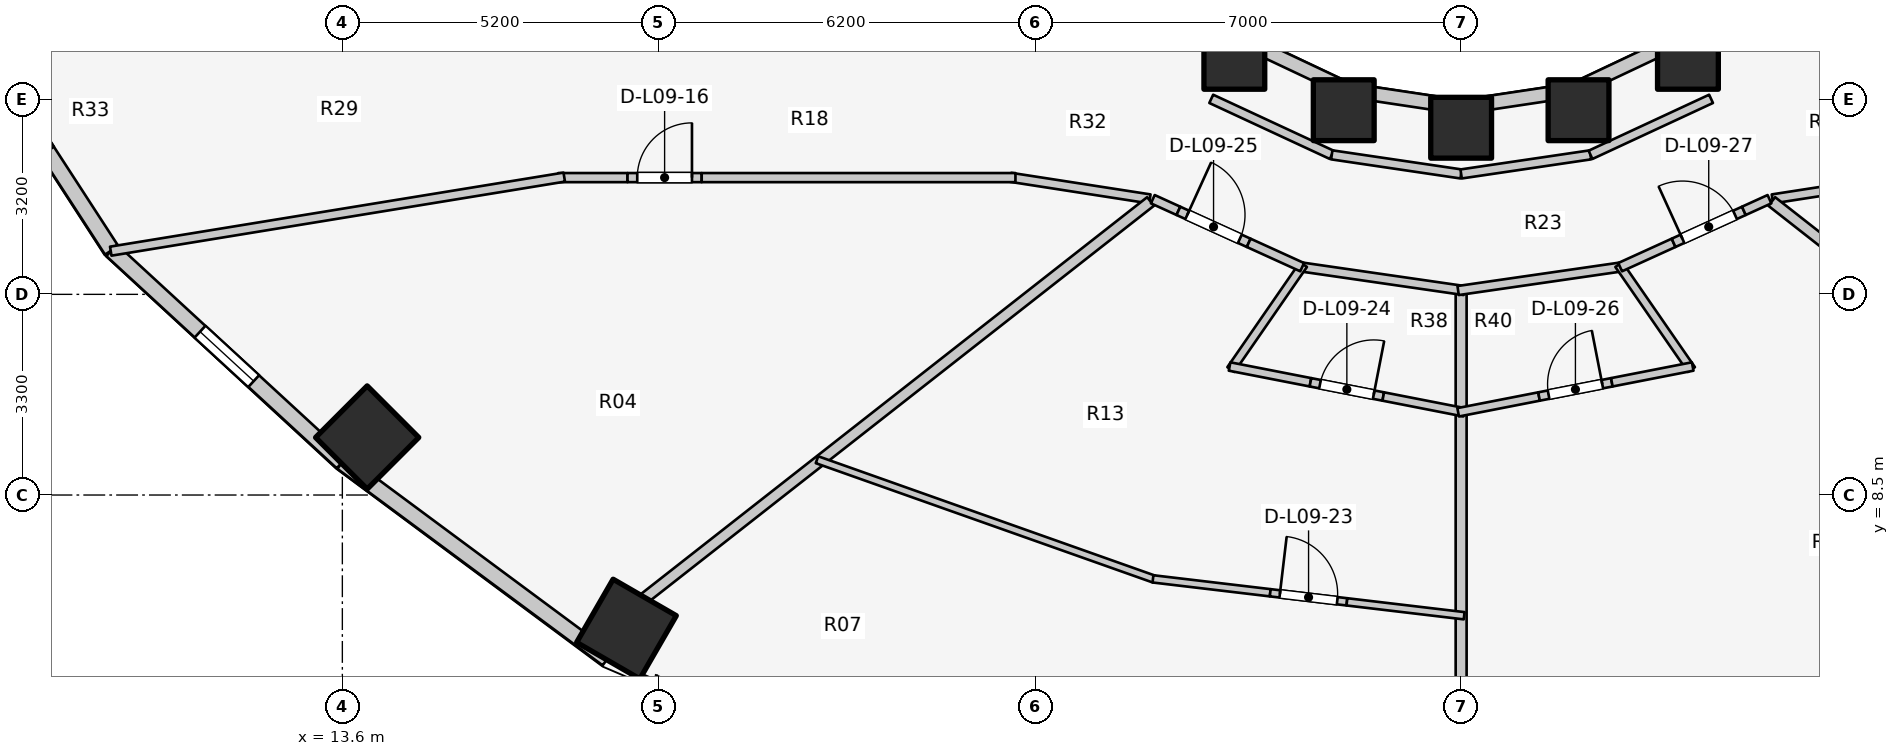
"""IFC4 building model, lengths in metres.
Left out: names, types, materials, properties, quantities, classifications, styles, units other than length and angle.
Written with IfcOpenShell. Run it as: python <this file> out.ifc"""

import sys

from ifc_helpers import new_model, si_unit, direction, frame, frame_2d, origin, origin_2d, place, context, subcontext, project, spatial, rectangle, extrude, element, fill, save


model = new_model("IFC4")
c1 = context("Model", 3, precision=1e-05, world=origin(), true_north=direction((0.0, 1.0)))
c2 = subcontext(c1, "Body", "Model", "MODEL_VIEW")
j1 = project(units=[si_unit("LENGTHUNIT", "METRE"), si_unit("PLANEANGLEUNIT", "RADIAN")], contexts=[c1])
p1 = place(None, origin())
s1 = spatial("IfcSite", under=j1, at=p1, CompositionType="ELEMENT")
p2 = place(p1, origin())
s2 = spatial("IfcBuilding", under=s1, at=p2, CompositionType="ELEMENT")
p3 = place(p2, frame((0.0, 0.0, 33.8)))
s3 = spatial("IfcBuildingStorey", under=s2, at=p3, CompositionType="ELEMENT", Elevation=33.8)
p4 = place(p3, frame((14.008, 9.446, 0.0), z_axis=(0.0, 0.0, 1.0), x_axis=(-0.707106781187, -0.707106781187, 0.0)))
e1 = element("IfcColumn", 1, at=p4, inside=s3, PredefinedType="COLUMN", context=c2, shape_type="SweptSolid", body=[
    extrude(rectangle(XDim=1.2, YDim=1.2, at=origin_2d()), origin(), (0.0, 0.0, 1.0), 3.1),
])
p5 = place(p3, frame((28.27, 15.673, 0.0), z_axis=(0.0, 0.0, 1.0), x_axis=(1.0, 0.0, 0.0)))
e2 = element("IfcColumn", 2, at=p5, inside=s3, PredefinedType="COLUMN", context=c2, shape_type="SweptSolid", body=[
    extrude(rectangle(XDim=1.0, YDim=1.0, at=origin_2d()), origin(), (0.0, 0.0, 1.0), 3.1),
])
p6 = place(p3, frame((18.273, 6.296, 0.0), z_axis=(0.0, 0.0, 1.0), x_axis=(-0.5, -0.866025403784, 0.0)))
e3 = element("IfcColumn", 3, at=p6, inside=s3, PredefinedType="COLUMN", context=c2, shape_type="SweptSolid", body=[
    extrude(rectangle(XDim=1.2, YDim=1.2, at=origin_2d()), origin(), (0.0, 0.0, 1.0), 3.1),
])
for number, where, z_axis, x_axis in (
    (4, (30.069, 14.828, 0.0), (0.0, 0.0, 1.0), (1.0, 0.0, 0.0)),
    (5, (32.0, 14.54, 0.0), (0.0, 0.0, 1.0), (1.0, 0.0, 0.0)),
    (6, (33.931, 14.828, 0.0), (0.0, 0.0, 1.0), (1.0, 0.0, 0.0)),
    (7, (35.73, 15.673, 0.0), (0.0, 0.0, 1.0), (1.0, 0.0, 0.0)),
):
    element("IfcColumn", number, at=place(p3, frame(where, z_axis=z_axis, x_axis=x_axis)), inside=s3, PredefinedType="COLUMN", context=c2, shape_type="SweptSolid", body=[
        extrude(rectangle(XDim=1.0, YDim=1.0, at=origin_2d()), origin(), (0.0, 0.0, 1.0), 3.1),
    ])
p7 = place(p3, frame((28.44, 15.968, 0.0), z_axis=(0.0, 0.0, 1.0), x_axis=(0.904179699603, -0.427152280606, 0.0)))
e8 = element("IfcWall", 8, at=p7, inside=s3, PredefinedType="STANDARD", context=c2, shape_type="SweptSolid", body=[
    extrude(rectangle(XDim=1.899, YDim=0.23, at=frame_2d((0.95, 0.0))), origin(), (0.0, 0.0, 1.0), 1.22),
])
for number, where, z_axis, x_axis in (
    (9, (30.157, 15.157, 0.0), (0.0, 0.0, 1.0), (0.989, -0.149, 0.0)),
    (10, (32.0, 14.88, 0.0), (0.0, 0.0, 1.0), (0.989, 0.149, 0.0)),
):
    element("IfcWall", number, at=place(p3, frame(where, z_axis=z_axis, x_axis=x_axis)), inside=s3, PredefinedType="STANDARD", context=c2, shape_type="SweptSolid", body=[
        extrude(rectangle(XDim=1.864, YDim=0.23, at=frame_2d((0.932, 0.0))), origin(), (0.0, 0.0, 1.0), 1.22),
    ])
p8 = place(p3, frame((33.843, 15.157, 0.0), z_axis=(0.0, 0.0, 1.0), x_axis=(0.904179699603, 0.427152280606, 0.0)))
e11 = element("IfcWall", 11, at=p8, inside=s3, PredefinedType="STANDARD", context=c2, shape_type="SweptSolid", body=[
    extrude(rectangle(XDim=1.899, YDim=0.23, at=frame_2d((0.95, 0.0))), origin(), (0.0, 0.0, 1.0), 1.22),
])
p9 = place(p3, frame((7.033, 16.795, 0.0), z_axis=(0.0, 0.0, 1.0), x_axis=(0.544578722263, -0.838709732421, 0.0)))
e12 = element("IfcWall", 12, at=p9, inside=s3, PredefinedType="STANDARD", context=c2, shape_type="SweptSolid", body=[
    extrude(rectangle(XDim=5.092, YDim=0.26, at=frame_2d((2.546, 0.0))), origin(), (0.0, 0.0, 1.0), 1.22),
])
p10 = place(p9, frame((1.946, 0.0, 0.15)))
e13 = element("IfcOpeningElement", 13, at=p10, cuts=e12, PredefinedType="OPENING", context=c2, shape_type="SweptSolid", body=[
    extrude(rectangle(XDim=1.2, YDim=0.9, at=frame_2d((0.6, 0.45))), frame((0.0, 0.14, 0.0), z_axis=(0.0, -1.0, 0.0), x_axis=(1.0, 0.0, 0.0)), (0.0, 0.0, 1.0), 0.28),
])
p11 = place(p3, frame((9.806, 12.524, 0.0), z_axis=(0.0, 0.0, 1.0), x_axis=(0.735655109293, -0.67735630223, 0.0)))
e14 = element("IfcWall", 14, at=p11, inside=s3, PredefinedType="STANDARD", context=c2, shape_type="SweptSolid", body=[
    extrude(rectangle(XDim=5.151, YDim=0.26, at=frame_2d((2.575, 0.0))), origin(), (0.0, 0.0, 1.0), 1.22),
])
p12 = place(p11, frame((1.976, 0.0, 0.15)))
e15 = element("IfcOpeningElement", 15, at=p12, cuts=e14, PredefinedType="OPENING", context=c2, shape_type="SweptSolid", body=[
    extrude(rectangle(XDim=1.2, YDim=0.9, at=frame_2d((0.6, 0.45))), frame((0.0, 0.14, 0.0), z_axis=(0.0, -1.0, 0.0), x_axis=(1.0, 0.0, 0.0)), (0.0, 0.0, 1.0), 0.28),
])
p13 = place(p3, frame((13.595, 9.035, 0.0), z_axis=(0.0, 0.0, 1.0), x_axis=(0.803477531792, -0.595335078679, 0.0)))
e16 = element("IfcWall", 16, at=p13, inside=s3, PredefinedType="STANDARD", context=c2, shape_type="SweptSolid", body=[
    extrude(rectangle(XDim=5.43, YDim=0.26, at=frame_2d((2.715, 0.0))), origin(), (0.0, 0.0, 1.0), 1.22),
])
p14 = place(p3, frame((27.89, 15.015, 0.0), z_axis=(0.0, 0.0, 1.0), x_axis=(0.906943449489, -0.421252393975, 0.0)))
e17 = element("IfcWall", 17, at=p14, inside=s3, PredefinedType="PARTITIONING", context=c2, shape_type="SweptSolid", body=[
    extrude(rectangle(XDim=2.186, YDim=0.15, at=frame_2d((1.093, 0.0))), origin(), (0.0, 0.0, 1.0), 1.22),
])
for number, where, z_axis, x_axis in (
    (18, (29.873, 14.094, 0.0), (0.0, 0.0, 1.0), (0.989, -0.146, 0.0)),
    (19, (32.0, 13.78, 0.0), (0.0, 0.0, 1.0), (0.989, 0.146, 0.0)),
):
    element("IfcWall", number, at=place(p3, frame(where, z_axis=z_axis, x_axis=x_axis)), inside=s3, PredefinedType="PARTITIONING", context=c2, shape_type="SweptSolid", body=[
        extrude(rectangle(XDim=2.151, YDim=0.15, at=frame_2d((1.075, 0.0))), origin(), (0.0, 0.0, 1.0), 1.22),
    ])
p15 = place(p3, frame((34.127, 14.094, 0.0), z_axis=(0.0, 0.0, 1.0), x_axis=(0.906943449489, 0.421252393975, 0.0)))
e20 = element("IfcWall", 20, at=p15, inside=s3, PredefinedType="PARTITIONING", context=c2, shape_type="SweptSolid", body=[
    extrude(rectangle(XDim=2.186, YDim=0.15, at=frame_2d((1.093, 0.0))), origin(), (0.0, 0.0, 1.0), 1.22),
])
p16 = place(p3, frame((26.881, 13.369, 0.0), z_axis=(0.0, 0.0, 1.0), x_axis=(-0.988184633586, 0.153268163508, 0.0)))
e21 = element("IfcWall", 21, at=p16, inside=s3, PredefinedType="PARTITIONING", context=c2, shape_type="SweptSolid", body=[
    extrude(rectangle(XDim=2.318, YDim=0.15, at=frame_2d((1.159, 0.0))), origin(), (0.0, 0.0, 1.0), 1.22),
])
p17 = place(p3, frame((17.15, 13.72, 0.0), z_axis=(0.0, 0.0, 1.0), x_axis=(1.0, 0.0, 0.0)))
e22 = element("IfcWall", 22, at=p17, inside=s3, PredefinedType="PARTITIONING", context=c2, shape_type="SweptSolid", body=[
    extrude(rectangle(XDim=1.14, YDim=0.15, at=frame_2d((0.57, 0.0))), origin(), (0.0, 0.0, 1.0), 2.575),
])
p18 = place(p3, frame((18.29, 13.72, 0.0), z_axis=(0.0, 0.0, 1.0), x_axis=(1.0, 0.0, 0.0)))
e23 = element("IfcWall", 23, at=p18, inside=s3, PredefinedType="PARTITIONING", context=c2, shape_type="SweptSolid", body=[
    extrude(rectangle(XDim=1.22, YDim=0.15, at=frame_2d((0.61, 0.0))), origin(), (0.0, 0.0, 1.0), 2.575),
])
p19 = place(p18, frame((0.16, 0.0, 0.0)))
e24 = element("IfcOpeningElement", 24, at=p19, cuts=e23, PredefinedType="OPENING", context=c2, shape_type="SweptSolid", body=[
    extrude(rectangle(XDim=0.9, YDim=2.1, at=frame_2d((0.45, 1.05))), frame((0.0, 0.085, 0.0), z_axis=(0.0, -1.0, 0.0), x_axis=(1.0, 0.0, 0.0)), (0.0, 0.0, 1.0), 0.17),
])
p20 = place(p3, frame((19.51, 13.72, 0.0), z_axis=(0.0, 0.0, 1.0), x_axis=(1.0, 0.0, 0.0)))
e25 = element("IfcWall", 25, at=p20, inside=s3, PredefinedType="PARTITIONING", context=c2, shape_type="SweptSolid", body=[
    extrude(rectangle(XDim=5.16, YDim=0.15, at=frame_2d((2.58, 0.0))), origin(), (0.0, 0.0, 1.0), 1.22),
])
p21 = place(p3, frame((17.249, 13.728, 0.0), z_axis=(0.0, 0.0, 1.0), x_axis=(-0.98693078372, -0.161144742846, 0.0)))
e26 = element("IfcWall", 26, at=p21, inside=s3, PredefinedType="PARTITIONING", context=c2, shape_type="SweptSolid", body=[
    extrude(rectangle(XDim=7.557, YDim=0.15, at=frame_2d((3.779, 0.0))), origin(), (0.0, 0.0, 1.0), 1.22),
])
p22 = place(p3, frame((37.119, 13.369, 0.0), z_axis=(0.0, 0.0, 1.0), x_axis=(0.988184633586, 0.153268163508, 0.0)))
e27 = element("IfcWall", 27, at=p22, inside=s3, PredefinedType="PARTITIONING", context=c2, shape_type="SweptSolid", body=[
    extrude(rectangle(XDim=2.318, YDim=0.15, at=frame_2d((1.159, 0.0))), origin(), (0.0, 0.0, 1.0), 1.22),
])
p23 = place(p3, frame((26.892, 13.327, 0.0), z_axis=(0.0, 0.0, 1.0), x_axis=(-0.78700868866, -0.616941912966, 0.0)))
e28 = element("IfcWall", 28, at=p23, inside=s3, PredefinedType="PARTITIONING", context=c2, shape_type="SweptSolid", body=[
    extrude(rectangle(XDim=10.583, YDim=0.18, at=frame_2d((5.292, 0.0))), origin(), (0.0, 0.0, 1.0), 1.22),
])
p24 = place(p3, frame((32.0, 11.815, 0.0), z_axis=(0.0, 0.0, 1.0), x_axis=(0.0, -1.0, 0.0)))
e29 = element("IfcWall", 29, at=p24, inside=s3, PredefinedType="PARTITIONING", context=c2, shape_type="SweptSolid", body=[
    extrude(rectangle(XDim=8.115, YDim=0.18, at=frame_2d((4.058, 0.0))), origin(), (0.0, 0.0, 1.0), 1.22),
])
p25 = place(p3, frame((37.108, 13.327, 0.0), z_axis=(0.0, 0.0, 1.0), x_axis=(0.78700868866, -0.616941912966, 0.0)))
e30 = element("IfcWall", 30, at=p25, inside=s3, PredefinedType="PARTITIONING", context=c2, shape_type="SweptSolid", body=[
    extrude(rectangle(XDim=10.583, YDim=0.18, at=frame_2d((5.292, 0.0))), origin(), (0.0, 0.0, 1.0), 1.22),
])
p26 = place(p3, frame((21.406, 9.081, 0.0), z_axis=(0.0, 0.0, 1.0), x_axis=(0.942625048334, -0.333853288517, 0.0)))
e31 = element("IfcWall", 31, at=p26, inside=s3, PredefinedType="MOVABLE", context=c2, shape_type="SweptSolid", body=[
    extrude(rectangle(XDim=5.882, YDim=0.12, at=frame_2d((2.941, 0.0))), origin(), (0.0, 0.0, 1.0), 1.22),
])
p27 = place(p3, frame((26.932, 7.121, 0.0), z_axis=(0.0, 0.0, 1.0), x_axis=(0.993052427277, -0.117672752492, 0.0)))
e32 = element("IfcWall", 32, at=p27, inside=s3, PredefinedType="MOVABLE", context=c2, shape_type="SweptSolid", body=[
    extrude(rectangle(XDim=1.942, YDim=0.12, at=frame_2d((0.971, 0.0))), origin(), (0.0, 0.0, 1.0), 2.575),
])
p28 = place(p3, frame((28.86, 6.893, 0.0), z_axis=(0.0, 0.0, 1.0), x_axis=(0.993055805273, -0.11764424174, 0.0)))
e33 = element("IfcWall", 33, at=p28, inside=s3, PredefinedType="MOVABLE", context=c2, shape_type="SweptSolid", body=[
    extrude(rectangle(XDim=1.27, YDim=0.12, at=frame_2d((0.635, 0.0))), origin(), (0.0, 0.0, 1.0), 2.575),
])
p29 = place(p28, frame((0.16, 0.0, 0.0)))
e34 = element("IfcOpeningElement", 34, at=p29, cuts=e33, PredefinedType="OPENING", context=c2, shape_type="SweptSolid", body=[
    extrude(rectangle(XDim=0.95, YDim=2.1, at=frame_2d((0.475, 1.05))), frame((0.0, 0.07, 0.0), z_axis=(0.0, -1.0, 0.0), x_axis=(1.0, 0.0, 0.0)), (0.0, 0.0, 1.0), 0.14),
])
p30 = place(p3, frame((30.121, 6.743, 0.0), z_axis=(0.0, 0.0, 1.0), x_axis=(0.993052427277, -0.117672752492, 0.0)))
e35 = element("IfcWall", 35, at=p30, inside=s3, PredefinedType="MOVABLE", context=c2, shape_type="SweptSolid", body=[
    extrude(rectangle(XDim=1.942, YDim=0.12, at=frame_2d((0.971, 0.0))), origin(), (0.0, 0.0, 1.0), 1.22),
])
p31 = place(p3, frame((29.329, 12.256, 0.0), z_axis=(0.0, 0.0, 1.0), x_axis=(0.989701115085, -0.143149232617, 0.0)))
e36 = element("IfcWall", 36, at=p31, inside=s3, PredefinedType="PARTITIONING", context=c2, shape_type="SweptSolid", body=[
    extrude(rectangle(XDim=2.749, YDim=0.15, at=frame_2d((1.375, 0.0))), origin(), (0.0, 0.0, 1.0), 1.22),
])
p32 = place(p3, frame((29.406, 12.29, 0.0), z_axis=(0.0, 0.0, 1.0), x_axis=(-0.568653635333, -0.822577074214, 0.0)))
e37 = element("IfcWall", 37, at=p32, inside=s3, PredefinedType="PLUMBINGWALL", context=c2, shape_type="SweptSolid", body=[
    extrude(rectangle(XDim=2.1, YDim=0.14, at=frame_2d((1.05, 0.0))), origin(), (0.0, 0.0, 1.0), 1.22),
])
p33 = place(p3, frame((28.192, 10.614, 0.0), z_axis=(0.0, 0.0, 1.0), x_axis=(0.981484809036, -0.191539994861, 0.0)))
e38 = element("IfcWall", 38, at=p33, inside=s3, PredefinedType="PLUMBINGWALL", context=c2, shape_type="SweptSolid", body=[
    extrude(rectangle(XDim=1.355, YDim=0.14, at=frame_2d((0.677, 0.0))), origin(), (0.0, 0.0, 1.0), 1.22),
])
p34 = place(p3, frame((29.522, 10.354, 0.0), z_axis=(0.0, 0.0, 1.0), x_axis=(0.981455717174, -0.191689006535, 0.0)))
e39 = element("IfcWall", 39, at=p34, inside=s3, PredefinedType="PLUMBINGWALL", context=c2, shape_type="SweptSolid", body=[
    extrude(rectangle(XDim=1.22, YDim=0.14, at=frame_2d((0.61, 0.0))), origin(), (0.0, 0.0, 1.0), 2.575),
])
p35 = place(p34, frame((0.16, 0.0, 0.0)))
e40 = element("IfcOpeningElement", 40, at=p35, cuts=e39, PredefinedType="OPENING", context=c2, shape_type="SweptSolid", body=[
    extrude(rectangle(XDim=0.9, YDim=2.1, at=frame_2d((0.45, 1.05))), frame((0.0, 0.08, 0.0), z_axis=(0.0, -1.0, 0.0), x_axis=(1.0, 0.0, 0.0)), (0.0, 0.0, 1.0), 0.16),
])
p36 = place(p3, frame((30.719, 10.12, 0.0), z_axis=(0.0, 0.0, 1.0), x_axis=(0.981450920641, -0.191713563349, 0.0)))
e41 = element("IfcWall", 41, at=p36, inside=s3, PredefinedType="PLUMBINGWALL", context=c2, shape_type="SweptSolid", body=[
    extrude(rectangle(XDim=1.355, YDim=0.14, at=frame_2d((0.677, 0.0))), origin(), (0.0, 0.0, 1.0), 1.22),
])
p37 = place(p3, frame((26.929, 13.365, 0.0), z_axis=(0.0, 0.0, 1.0), x_axis=(0.910185690705, -0.414200444756, 0.0)))
e42 = element("IfcWall", 42, at=p37, inside=s3, PredefinedType="PARTITIONING", context=c2, shape_type="SweptSolid", body=[
    extrude(rectangle(XDim=0.463, YDim=0.15, at=frame_2d((0.231, 0.0))), origin(), (0.0, 0.0, 1.0), 2.575),
])
p38 = place(p3, frame((27.35, 13.173, 0.0), z_axis=(0.0, 0.0, 1.0), x_axis=(0.910168885926, -0.414237370469, 0.0)))
e43 = element("IfcWall", 43, at=p38, inside=s3, PredefinedType="PARTITIONING", context=c2, shape_type="SweptSolid", body=[
    extrude(rectangle(XDim=1.27, YDim=0.15, at=frame_2d((0.635, 0.0))), origin(), (0.0, 0.0, 1.0), 2.16),
])
p39 = place(p38, frame((0.16, 0.0, 0.0)))
e44 = element("IfcOpeningElement", 44, at=p39, cuts=e43, PredefinedType="OPENING", context=c2, shape_type="SweptSolid", body=[
    extrude(rectangle(XDim=0.95, YDim=2.1, at=frame_2d((0.475, 1.05))), frame((0.0, 0.085, 0.0), z_axis=(0.0, -1.0, 0.0), x_axis=(1.0, 0.0, 0.0)), (0.0, 0.0, 1.0), 0.17),
])
p40 = place(p3, frame((28.506, 12.647, 0.0), z_axis=(0.0, 0.0, 1.0), x_axis=(0.910210554917, -0.414145802487, 0.0)))
e45 = element("IfcWall", 45, at=p40, inside=s3, PredefinedType="PARTITIONING", context=c2, shape_type="SweptSolid", body=[
    extrude(rectangle(XDim=0.966, YDim=0.15, at=frame_2d((0.483, 0.0))), origin(), (0.0, 0.0, 1.0), 1.22),
])
p41 = place(p3, frame((31.95, 11.863, 0.0), z_axis=(0.0, 0.0, 1.0), x_axis=(0.989701115085, 0.143149232617, 0.0)))
e46 = element("IfcWall", 46, at=p41, inside=s3, PredefinedType="PARTITIONING", context=c2, shape_type="SweptSolid", body=[
    extrude(rectangle(XDim=2.749, YDim=0.15, at=frame_2d((1.375, 0.0))), origin(), (0.0, 0.0, 1.0), 1.22),
])
p42 = place(p3, frame((34.594, 12.29, 0.0), z_axis=(0.0, 0.0, 1.0), x_axis=(0.568653635333, -0.822577074214, 0.0)))
e47 = element("IfcWall", 47, at=p42, inside=s3, PredefinedType="PLUMBINGWALL", context=c2, shape_type="SweptSolid", body=[
    extrude(rectangle(XDim=2.1, YDim=0.14, at=frame_2d((1.05, 0.0))), origin(), (0.0, 0.0, 1.0), 1.22),
])
p43 = place(p3, frame((31.951, 9.86, 0.0), z_axis=(0.0, 0.0, 1.0), x_axis=(0.981457541308, 0.191679666658, 0.0)))
e48 = element("IfcWall", 48, at=p43, inside=s3, PredefinedType="PLUMBINGWALL", context=c2, shape_type="SweptSolid", body=[
    extrude(rectangle(XDim=1.355, YDim=0.14, at=frame_2d((0.678, 0.0))), origin(), (0.0, 0.0, 1.0), 1.22),
])
p44 = place(p3, frame((33.281, 10.12, 0.0), z_axis=(0.0, 0.0, 1.0), x_axis=(0.981448362659, 0.191726658121, 0.0)))
e49 = element("IfcWall", 49, at=p44, inside=s3, PredefinedType="PLUMBINGWALL", context=c2, shape_type="SweptSolid", body=[
    extrude(rectangle(XDim=1.22, YDim=0.14, at=frame_2d((0.61, 0.0))), origin(), (0.0, 0.0, 1.0), 2.575),
])
p45 = place(p44, frame((0.16, 0.0, 0.0)))
e50 = element("IfcOpeningElement", 50, at=p45, cuts=e49, PredefinedType="OPENING", context=c2, shape_type="SweptSolid", body=[
    extrude(rectangle(XDim=0.9, YDim=2.1, at=frame_2d((0.45, 1.05))), frame((0.0, 0.08, 0.0), z_axis=(0.0, -1.0, 0.0), x_axis=(1.0, 0.0, 0.0)), (0.0, 0.0, 1.0), 0.16),
])
p46 = place(p3, frame((34.478, 10.354, 0.0), z_axis=(0.0, 0.0, 1.0), x_axis=(0.981484809036, 0.191539994861, 0.0)))
e51 = element("IfcWall", 51, at=p46, inside=s3, PredefinedType="PLUMBINGWALL", context=c2, shape_type="SweptSolid", body=[
    extrude(rectangle(XDim=1.355, YDim=0.14, at=frame_2d((0.677, 0.0))), origin(), (0.0, 0.0, 1.0), 1.22),
])
p47 = place(p3, frame((34.615, 12.247, 0.0), z_axis=(0.0, 0.0, 1.0), x_axis=(0.910210554917, 0.414145802487, 0.0)))
e52 = element("IfcWall", 52, at=p47, inside=s3, PredefinedType="PARTITIONING", context=c2, shape_type="SweptSolid", body=[
    extrude(rectangle(XDim=0.966, YDim=0.15, at=frame_2d((0.483, 0.0))), origin(), (0.0, 0.0, 1.0), 1.22),
])
p48 = place(p3, frame((35.494, 12.647, 0.0), z_axis=(0.0, 0.0, 1.0), x_axis=(0.910168885926, 0.414237370469, 0.0)))
e53 = element("IfcWall", 53, at=p48, inside=s3, PredefinedType="PARTITIONING", context=c2, shape_type="SweptSolid", body=[
    extrude(rectangle(XDim=1.27, YDim=0.15, at=frame_2d((0.635, 0.0))), origin(), (0.0, 0.0, 1.0), 2.16),
])
p49 = place(p48, frame((0.16, 0.0, 0.0)))
e54 = element("IfcOpeningElement", 54, at=p49, cuts=e53, PredefinedType="OPENING", context=c2, shape_type="SweptSolid", body=[
    extrude(rectangle(XDim=0.95, YDim=2.1, at=frame_2d((0.475, 1.05))), frame((0.0, 0.085, 0.0), z_axis=(0.0, -1.0, 0.0), x_axis=(1.0, 0.0, 0.0)), (0.0, 0.0, 1.0), 0.17),
])
p50 = place(p3, frame((36.65, 13.173, 0.0), z_axis=(0.0, 0.0, 1.0), x_axis=(0.910185690705, 0.414200444756, 0.0)))
e55 = element("IfcWall", 55, at=p50, inside=s3, PredefinedType="PARTITIONING", context=c2, shape_type="SweptSolid", body=[
    extrude(rectangle(XDim=0.463, YDim=0.15, at=frame_2d((0.231, 0.0))), origin(), (0.0, 0.0, 1.0), 2.575),
])
p51 = place(p12, origin())
e56 = element("IfcWindow", 56, at=p51, inside=s3, PartitioningType="SINGLE_PANEL", PredefinedType="WINDOW", context=c2, shape_type="SweptSolid", body=[
    extrude(rectangle(XDim=1.2, YDim=0.9, at=frame_2d((0.6, 0.45))), frame((0.0, 0.03, 0.0), z_axis=(0.0, -1.0, 0.0), x_axis=(1.0, 0.0, 0.0)), (0.0, 0.0, 1.0), 0.06),
])
fill(e15, e56)
p52 = place(p19, origin())
e57 = element("IfcDoor", 57, at=p52, inside=s3, OperationType="SINGLE_SWING_RIGHT", PredefinedType="DOOR", context=c2, shape_type="SweptSolid", body=[
    extrude(rectangle(XDim=0.9, YDim=2.1, at=frame_2d((0.45, 1.05))), frame((0.0, 0.025, 0.0), z_axis=(0.0, -1.0, 0.0), x_axis=(1.0, 0.0, 0.0)), (0.0, 0.0, 1.0), 0.05),
])
fill(e24, e57)
p53 = place(p29, origin())
e58 = element("IfcDoor", 58, at=p53, inside=s3, OperationType="SINGLE_SWING_LEFT", PredefinedType="DOOR", context=c2, shape_type="SweptSolid", body=[
    extrude(rectangle(XDim=0.95, YDim=2.1, at=frame_2d((0.475, 1.05))), frame((0.0, 0.025, 0.0), z_axis=(0.0, -1.0, 0.0), x_axis=(1.0, 0.0, 0.0)), (0.0, 0.0, 1.0), 0.05),
])
fill(e34, e58)
p54 = place(p35, origin())
e59 = element("IfcDoor", 59, at=p54, inside=s3, OperationType="SINGLE_SWING_RIGHT", PredefinedType="DOOR", context=c2, shape_type="SweptSolid", body=[
    extrude(rectangle(XDim=0.9, YDim=2.1, at=frame_2d((0.45, 1.05))), frame((0.0, 0.025, 0.0), z_axis=(0.0, -1.0, 0.0), x_axis=(1.0, 0.0, 0.0)), (0.0, 0.0, 1.0), 0.05),
])
fill(e40, e59)
p55 = place(p39, origin())
e60 = element("IfcDoor", 60, at=p55, inside=s3, OperationType="SINGLE_SWING_LEFT", PredefinedType="DOOR", context=c2, shape_type="SweptSolid", body=[
    extrude(rectangle(XDim=0.95, YDim=2.1, at=frame_2d((0.475, 1.05))), frame((0.0, 0.025, 0.0), z_axis=(0.0, -1.0, 0.0), x_axis=(1.0, 0.0, 0.0)), (0.0, 0.0, 1.0), 0.05),
])
fill(e44, e60)
p56 = place(p45, origin())
e61 = element("IfcDoor", 61, at=p56, inside=s3, OperationType="SINGLE_SWING_RIGHT", PredefinedType="DOOR", context=c2, shape_type="SweptSolid", body=[
    extrude(rectangle(XDim=0.9, YDim=2.1, at=frame_2d((0.45, 1.05))), frame((0.0, 0.025, 0.0), z_axis=(0.0, -1.0, 0.0), x_axis=(1.0, 0.0, 0.0)), (0.0, 0.0, 1.0), 0.05),
])
fill(e50, e61)
p57 = place(p49, origin())
e62 = element("IfcDoor", 62, at=p57, inside=s3, OperationType="SINGLE_SWING_LEFT", PredefinedType="DOOR", context=c2, shape_type="SweptSolid", body=[
    extrude(rectangle(XDim=0.95, YDim=2.1, at=frame_2d((0.475, 1.05))), frame((0.0, 0.025, 0.0), z_axis=(0.0, -1.0, 0.0), x_axis=(1.0, 0.0, 0.0)), (0.0, 0.0, 1.0), 0.05),
])
fill(e54, e62)
save(model, sys.argv[1])
